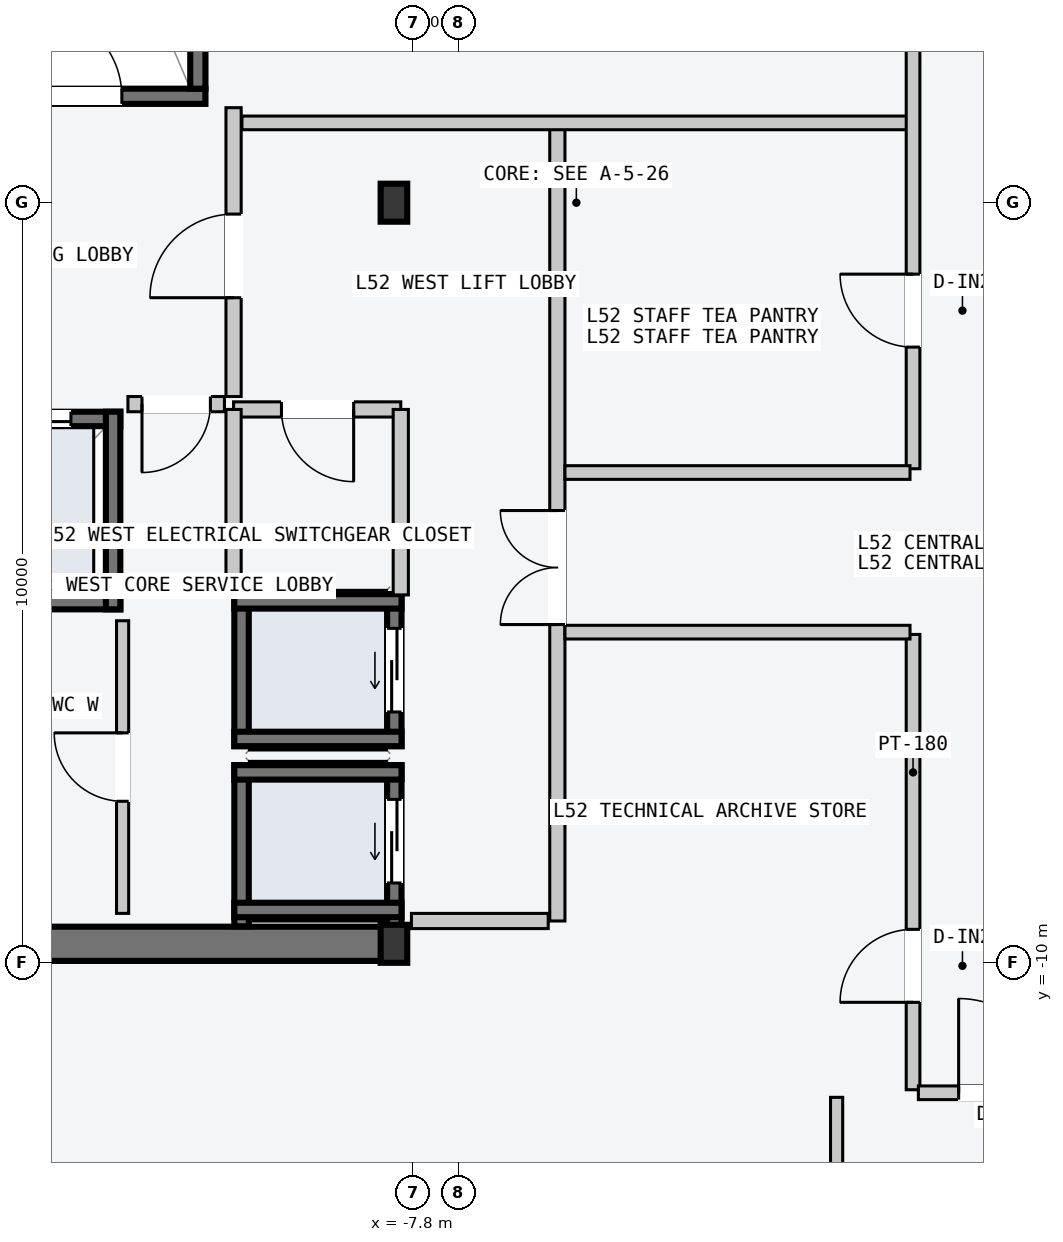
"""IFC4 building model, lengths in metres.
Left out: names, types, materials, properties, quantities, classifications, styles, units other than length and angle.
Written with IfcOpenShell. Run it as: python <this file> out.ifc"""

import sys

from ifc_helpers import new_model, si_unit, direction, frame, frame_2d, origin, origin_2d, place, context, subcontext, project, spatial, rectangle, i_section, extrude, element, fill, save


model = new_model("IFC4")
c1 = context("Model", 3, precision=1e-05, world=origin(), true_north=direction((0.0, 1.0)))
c2 = subcontext(c1, "Body", "Model", "MODEL_VIEW")
j1 = project(units=[si_unit("LENGTHUNIT", "METRE"), si_unit("PLANEANGLEUNIT", "RADIAN")], contexts=[c1])
p1 = place(None, origin())
s1 = spatial("IfcSite", under=j1, at=p1, CompositionType="ELEMENT")
p2 = place(p1, origin())
s2 = spatial("IfcBuilding", under=s1, at=p2, CompositionType="ELEMENT")
p3 = place(p2, frame((0.0, 0.0, 198.3)))
s3 = spatial("IfcBuildingStorey", under=s2, at=p3, CompositionType="ELEMENT", Elevation=198.3)
p4 = place(p3, frame((-14.53, -9.75, -0.2), z_axis=(0.0, 0.0, 1.0), x_axis=(1.0, 0.0, 0.0)))
e1 = element("IfcWall", 1, at=p4, inside=s3, PredefinedType="SHEAR", context=c2, shape_type="SweptSolid", body=[
    extrude(rectangle(XDim=6.46, YDim=0.45, at=frame_2d((3.23, 0.0))), origin(), (0.0, 0.0, 1.0), 3.6),
])
p5 = place(p3, frame((-14.25, 1.4, -0.2), z_axis=(0.0, 0.0, 1.0), x_axis=(1.0, 0.0, 0.0)))
e2 = element("IfcWall", 2, at=p5, inside=s3, PredefinedType="SOLIDWALL", context=c2, shape_type="SweptSolid", body=[
    extrude(rectangle(XDim=3.72, YDim=0.2, at=frame_2d((1.86, 0.0))), origin(), (0.0, 0.0, 1.0), 3.6),
])
p6 = place(p5, frame((1.5, 0.0, 0.2)))
e3 = element("IfcOpeningElement", 3, at=p6, cuts=e2, PredefinedType="OPENING", context=c2, shape_type="SweptSolid", body=[
    extrude(rectangle(XDim=1.12, YDim=2.18, at=frame_2d((0.56, 1.09))), frame((0.0, 0.11, 0.0), z_axis=(0.0, -1.0, 0.0), x_axis=(1.0, 0.0, 0.0)), (0.0, 0.0, 1.0), 0.22),
])
p7 = place(p3, frame((-10.63, 1.5, -0.2), z_axis=(0.0, 0.0, 1.0), x_axis=(0.0, 1.0, 0.0)))
e4 = element("IfcWall", 4, at=p7, inside=s3, PredefinedType="SOLIDWALL", context=c2, shape_type="SweptSolid", body=[
    extrude(rectangle(XDim=7.8, YDim=0.2, at=frame_2d((3.9, 0.0))), origin(), (0.0, 0.0, 1.0), 3.6),
])
for number, where, z_axis, x_axis in (
    (5, (-8.05, -9.75, 0.0), (0.0, 0.0, 1.0), (1.0, 0.0, 0.0)),
    (6, (-8.05, 0.0, 0.0), (0.0, 0.0, 1.0), (1.0, 0.0, 0.0)),
):
    element("IfcColumn", number, at=place(p3, frame(where, z_axis=z_axis, x_axis=x_axis)), inside=s3, PredefinedType="COLUMN", context=c2, shape_type="SweptSolid", body=[
        extrude(i_section(OverallWidth=0.35, OverallDepth=0.5, WebThickness=0.02, FlangeThickness=0.032, at=origin_2d()), origin(), (0.0, 0.0, 1.0), 3.6),
    ])
p8 = place(p3, frame((-8.045, -9.52, -0.2), z_axis=(0.0, 0.0, 1.0), x_axis=(0.0, 1.0, 0.0)))
e7 = element("IfcWall", 7, at=p8, inside=s3, PredefinedType="SOLIDWALL", context=c2, shape_type="SweptSolid", body=[
    extrude(rectangle(XDim=2.12, YDim=0.19, at=frame_2d((1.06, 0.0))), origin(), (0.0, 0.0, 1.0), 3.6),
])
p9 = place(p8, frame((0.57, 0.0, 0.2)))
e8 = element("IfcOpeningElement", 8, at=p9, cuts=e7, PredefinedType="OPENING", context=c2, shape_type="SweptSolid", body=[
    extrude(rectangle(XDim=1.1, YDim=2.2, at=frame_2d((0.55, 1.1))), frame((0.0, 0.105, 0.0), z_axis=(0.0, -1.0, 0.0), x_axis=(1.0, 0.0, 0.0)), (0.0, 0.0, 1.0), 0.21),
])
p10 = place(p3, frame((-10.055, -9.52, -0.2), z_axis=(0.0, 0.0, 1.0), x_axis=(0.0, 1.0, 0.0)))
e9 = element("IfcWall", 9, at=p10, inside=s3, PredefinedType="SOLIDWALL", context=c2, shape_type="SweptSolid", body=[
    extrude(rectangle(XDim=2.12, YDim=0.19, at=frame_2d((1.06, 0.0))), origin(), (0.0, 0.0, 1.0), 3.6),
])
for number, where, z_axis, x_axis in (
    (10, (-10.15, -7.495, -0.2), (0.0, 0.0, 1.0), (1.0, 0.0, 0.0)),
    (11, (-10.15, -9.305, -0.2), (0.0, 0.0, 1.0), (1.0, 0.0, 0.0)),
):
    element("IfcWall", number, at=place(p3, frame(where, z_axis=z_axis, x_axis=x_axis)), inside=s3, PredefinedType="SOLIDWALL", context=c2, shape_type="SweptSolid", body=[
        extrude(rectangle(XDim=2.2, YDim=0.19, at=frame_2d((1.1, 0.0))), origin(), (0.0, 0.0, 1.0), 3.6),
    ])
p11 = place(p3, frame((-8.045, -7.15, -0.2), z_axis=(0.0, 0.0, 1.0), x_axis=(0.0, 1.0, 0.0)))
e12 = element("IfcWall", 12, at=p11, inside=s3, PredefinedType="SOLIDWALL", context=c2, shape_type="SweptSolid", body=[
    extrude(rectangle(XDim=2.0, YDim=0.19, at=frame_2d((1.0, 0.0))), origin(), (0.0, 0.0, 1.0), 3.6),
])
p12 = place(p11, frame((0.45, 0.0, 0.2)))
e13 = element("IfcOpeningElement", 13, at=p12, cuts=e12, PredefinedType="OPENING", context=c2, shape_type="SweptSolid", body=[
    extrude(rectangle(XDim=1.1, YDim=2.2, at=frame_2d((0.55, 1.1))), frame((0.0, 0.105, 0.0), z_axis=(0.0, -1.0, 0.0), x_axis=(1.0, 0.0, 0.0)), (0.0, 0.0, 1.0), 0.21),
])
p13 = place(p3, frame((-10.055, -7.15, -0.2), z_axis=(0.0, 0.0, 1.0), x_axis=(0.0, 1.0, 0.0)))
e14 = element("IfcWall", 14, at=p13, inside=s3, PredefinedType="SOLIDWALL", context=c2, shape_type="SweptSolid", body=[
    extrude(rectangle(XDim=2.0, YDim=0.19, at=frame_2d((1.0, 0.0))), origin(), (0.0, 0.0, 1.0), 3.6),
])
for number, where, z_axis, x_axis in (
    (15, (-10.15, -5.245, -0.2), (0.0, 0.0, 1.0), (1.0, 0.0, 0.0)),
    (16, (-10.15, -7.055, -0.2), (0.0, 0.0, 1.0), (1.0, 0.0, 0.0)),
):
    element("IfcWall", number, at=place(p3, frame(where, z_axis=z_axis, x_axis=x_axis)), inside=s3, PredefinedType="SOLIDWALL", context=c2, shape_type="SweptSolid", body=[
        extrude(rectangle(XDim=2.2, YDim=0.19, at=frame_2d((1.1, 0.0))), origin(), (0.0, 0.0, 1.0), 3.6),
    ])
p14 = place(p3, frame((-14.33, -2.845, -0.2), z_axis=(0.0, 0.0, 1.0), x_axis=(1.0, 0.0, 0.0)))
e17 = element("IfcWall", 17, at=p14, inside=s3, PredefinedType="SOLIDWALL", context=c2, shape_type="SweptSolid", body=[
    extrude(rectangle(XDim=2.68, YDim=0.19, at=frame_2d((1.34, 0.0))), origin(), (0.0, 0.0, 1.0), 3.6),
])
p15 = place(p14, frame((0.83, 0.0, 0.2)))
e18 = element("IfcOpeningElement", 18, at=p15, cuts=e17, PredefinedType="OPENING", context=c2, shape_type="SweptSolid", body=[
    extrude(rectangle(XDim=1.2, YDim=2.2, at=frame_2d((0.6, 1.1))), frame((0.0, 0.105, 0.0), z_axis=(0.0, -1.0, 0.0), x_axis=(1.0, 0.0, 0.0)), (0.0, 0.0, 1.0), 0.21),
])
p16 = place(p3, frame((-14.33, -5.255, -0.2), z_axis=(0.0, 0.0, 1.0), x_axis=(1.0, 0.0, 0.0)))
e19 = element("IfcWall", 19, at=p16, inside=s3, PredefinedType="SOLIDWALL", context=c2, shape_type="SweptSolid", body=[
    extrude(rectangle(XDim=2.68, YDim=0.19, at=frame_2d((1.34, 0.0))), origin(), (0.0, 0.0, 1.0), 3.6),
])
p17 = place(p3, frame((-11.745, -5.35, -0.2), z_axis=(0.0, 0.0, 1.0), x_axis=(0.0, 1.0, 0.0)))
e20 = element("IfcWall", 20, at=p17, inside=s3, PredefinedType="SOLIDWALL", context=c2, shape_type="SweptSolid", body=[
    extrude(rectangle(XDim=2.6, YDim=0.19, at=frame_2d((1.3, 0.0))), origin(), (0.0, 0.0, 1.0), 3.6),
])
p18 = place(p3, frame((-5.9, -9.45, 0.0), z_axis=(0.0, 0.0, 1.0), x_axis=(0.0, 1.0, 0.0)))
e21 = element("IfcWall", 21, at=p18, inside=s3, PredefinedType="PARTITIONING", context=c2, shape_type="SweptSolid", body=[
    extrude(rectangle(XDim=10.5, YDim=0.2, at=frame_2d((5.25, 0.0))), origin(), (0.0, 0.0, 1.0), 3.4),
])
p19 = place(p18, frame((3.9, 0.0, 0.0)))
e22 = element("IfcOpeningElement", 22, at=p19, cuts=e21, PredefinedType="OPENING", context=c2, shape_type="SweptSolid", body=[
    extrude(rectangle(XDim=1.5, YDim=2.2, at=frame_2d((0.75, 1.1))), frame((0.0, 0.11, 0.0), z_axis=(0.0, -1.0, 0.0), x_axis=(1.0, 0.0, 0.0)), (0.0, 0.0, 1.0), 0.22),
])
p20 = place(p3, frame((-6.02, -9.45, 0.0), z_axis=(0.0, 0.0, 1.0), x_axis=(-1.0, 0.0, 0.0)))
e23 = element("IfcWall", 23, at=p20, inside=s3, PredefinedType="PARTITIONING", context=c2, shape_type="SweptSolid", body=[
    extrude(rectangle(XDim=1.8, YDim=0.2, at=frame_2d((0.9, 0.0))), origin(), (0.0, 0.0, 1.0), 3.4),
])
p21 = place(p3, frame((-10.16, -2.55, 0.0), z_axis=(0.0, 0.0, 1.0), x_axis=(0.0, 1.0, 0.0)))
e24 = element("IfcWall", 24, at=p21, inside=s3, PredefinedType="PARTITIONING", context=c2, shape_type="SweptSolid", body=[
    extrude(rectangle(XDim=3.8, YDim=0.2, at=frame_2d((1.9, 0.0))), origin(), (0.0, 0.0, 1.0), 3.4),
])
p22 = place(p21, frame((1.3, 0.0, 0.0)))
e25 = element("IfcOpeningElement", 25, at=p22, cuts=e24, PredefinedType="OPENING", context=c2, shape_type="SweptSolid", body=[
    extrude(rectangle(XDim=1.1, YDim=2.15, at=frame_2d((0.55, 1.075))), frame((0.0, 0.11, 0.0), z_axis=(0.0, -1.0, 0.0), x_axis=(1.0, 0.0, 0.0)), (0.0, 0.0, 1.0), 0.22),
])
p23 = place(p3, frame((-10.28, -2.65, 0.0), z_axis=(0.0, 0.0, 1.0), x_axis=(-1.0, 0.0, 0.0)))
e26 = element("IfcWall", 26, at=p23, inside=s3, PredefinedType="PARTITIONING", context=c2, shape_type="SweptSolid", body=[
    extrude(rectangle(XDim=1.27, YDim=0.2, at=frame_2d((0.635, 0.0))), origin(), (0.0, 0.0, 1.0), 3.4),
])
p24 = place(p23, frame((0.185, 0.0, 0.0)))
e27 = element("IfcOpeningElement", 27, at=p24, cuts=e26, PredefinedType="OPENING", context=c2, shape_type="SweptSolid", body=[
    extrude(rectangle(XDim=0.9, YDim=2.15, at=frame_2d((0.45, 1.075))), frame((0.0, 0.11, 0.0), z_axis=(0.0, -1.0, 0.0), x_axis=(1.0, 0.0, 0.0)), (0.0, 0.0, 1.0), 0.22),
])
p25 = place(p3, frame((-7.96, -2.72, 0.0), z_axis=(0.0, 0.0, 1.0), x_axis=(-1.0, 0.0, 0.0)))
e28 = element("IfcWall", 28, at=p25, inside=s3, PredefinedType="PARTITIONING", context=c2, shape_type="SweptSolid", body=[
    extrude(rectangle(XDim=2.2, YDim=0.2, at=frame_2d((1.1, 0.0))), origin(), (0.0, 0.0, 1.0), 3.4),
])
p26 = place(p25, frame((0.62, 0.0, 0.0)))
e29 = element("IfcOpeningElement", 29, at=p26, cuts=e28, PredefinedType="OPENING", context=c2, shape_type="SweptSolid", body=[
    extrude(rectangle(XDim=0.95, YDim=2.1, at=frame_2d((0.475, 1.05))), frame((0.0, 0.11, 0.0), z_axis=(0.0, -1.0, 0.0), x_axis=(1.0, 0.0, 0.0)), (0.0, 0.0, 1.0), 0.22),
])
for number, where, z_axis, x_axis in (
    (30, (-7.96, -5.16, 0.0), (0.0, 0.0, 1.0), (0.0, 1.0, 0.0)),
    (31, (-10.16, -5.16, 0.0), (0.0, 0.0, 1.0), (0.0, 1.0, 0.0)),
):
    element("IfcWall", number, at=place(p3, frame(where, z_axis=z_axis, x_axis=x_axis)), inside=s3, PredefinedType="PARTITIONING", context=c2, shape_type="SweptSolid", body=[
        extrude(rectangle(XDim=2.44, YDim=0.2, at=frame_2d((1.22, 0.0))), origin(), (0.0, 0.0, 1.0), 3.4),
    ])
p27 = place(p3, frame((-11.62, -9.35, 0.0), z_axis=(0.0, 0.0, 1.0), x_axis=(0.0, 1.0, 0.0)))
e32 = element("IfcWall", 32, at=p27, inside=s3, PredefinedType="PARTITIONING", context=c2, shape_type="SweptSolid", body=[
    extrude(rectangle(XDim=3.85, YDim=0.16, at=frame_2d((1.925, 0.0))), origin(), (0.0, 0.0, 1.0), 3.4),
])
p28 = place(p27, frame((1.475, 0.0, 0.0)))
e33 = element("IfcOpeningElement", 33, at=p28, cuts=e32, PredefinedType="OPENING", context=c2, shape_type="SweptSolid", body=[
    extrude(rectangle(XDim=0.9, YDim=2.15, at=frame_2d((0.45, 1.075))), frame((0.0, 0.09, 0.0), z_axis=(0.0, -1.0, 0.0), x_axis=(1.0, 0.0, 0.0)), (0.0, 0.0, 1.0), 0.18),
])
p29 = place(p3, frame((-10.05, 1.05, 0.0), z_axis=(0.0, 0.0, 1.0), x_axis=(1.0, 0.0, 0.0)))
e34 = element("IfcWall", 34, at=p29, inside=s3, PredefinedType="PARTITIONING", context=c2, shape_type="SweptSolid", body=[
    extrude(rectangle(XDim=8.79, YDim=0.18, at=frame_2d((4.395, 0.0))), origin(), (0.0, 0.0, 1.0), 3.4),
])
p30 = place(p3, frame((-1.22, -3.5, 0.0), z_axis=(0.0, 0.0, 1.0), x_axis=(0.0, 1.0, 0.0)))
e35 = element("IfcWall", 35, at=p30, inside=s3, PredefinedType="PARTITIONING", context=c2, shape_type="SweptSolid", body=[
    extrude(rectangle(XDim=15.17, YDim=0.18, at=frame_2d((7.585, 0.0))), origin(), (0.0, 0.0, 1.0), 3.4),
])
p31 = place(p30, frame((6.1, 0.0, 0.0)))
e36 = element("IfcOpeningElement", 36, at=p31, cuts=e35, PredefinedType="OPENING", context=c2, shape_type="SweptSolid", body=[
    extrude(rectangle(XDim=1.24, YDim=2.24, at=frame_2d((0.62, 1.12))), frame((0.0, 0.1, 0.0), z_axis=(0.0, -1.0, 0.0), x_axis=(1.0, 0.0, 0.0)), (0.0, 0.0, 1.0), 0.2),
])
p32 = place(p30, frame((1.6, 0.0, 0.0)))
e37 = element("IfcOpeningElement", 37, at=p32, cuts=e35, PredefinedType="OPENING", context=c2, shape_type="SweptSolid", body=[
    extrude(rectangle(XDim=0.96, YDim=2.18, at=frame_2d((0.48, 1.09))), frame((0.0, 0.1, 0.0), z_axis=(0.0, -1.0, 0.0), x_axis=(1.0, 0.0, 0.0)), (0.0, 0.0, 1.0), 0.2),
])
p33 = place(p3, frame((-5.8, -3.55, 0.0), z_axis=(0.0, 0.0, 1.0), x_axis=(1.0, 0.0, 0.0)))
e38 = element("IfcWall", 38, at=p33, inside=s3, PredefinedType="PARTITIONING", context=c2, shape_type="SweptSolid", body=[
    extrude(rectangle(XDim=4.54, YDim=0.18, at=frame_2d((2.27, 0.0))), origin(), (0.0, 0.0, 1.0), 3.4),
])
p34 = place(p3, frame((-1.22, -11.67, 0.0), z_axis=(0.0, 0.0, 1.0), x_axis=(0.0, 1.0, 0.0)))
e39 = element("IfcWall", 39, at=p34, inside=s3, PredefinedType="PARTITIONING", context=c2, shape_type="SweptSolid", body=[
    extrude(rectangle(XDim=5.99, YDim=0.18, at=frame_2d((2.995, 0.0))), origin(), (0.0, 0.0, 1.0), 3.4),
])
p35 = place(p34, frame((1.15, 0.0, 0.0)))
e40 = element("IfcOpeningElement", 40, at=p35, cuts=e39, PredefinedType="OPENING", context=c2, shape_type="SweptSolid", body=[
    extrude(rectangle(XDim=0.96, YDim=2.18, at=frame_2d((0.48, 1.09))), frame((0.0, 0.1, 0.0), z_axis=(0.0, -1.0, 0.0), x_axis=(1.0, 0.0, 0.0)), (0.0, 0.0, 1.0), 0.2),
])
p36 = place(p3, frame((-5.8, -5.65, 0.0), z_axis=(0.0, 0.0, 1.0), x_axis=(1.0, 0.0, 0.0)))
e41 = element("IfcWall", 41, at=p36, inside=s3, PredefinedType="PARTITIONING", context=c2, shape_type="SweptSolid", body=[
    extrude(rectangle(XDim=4.54, YDim=0.18, at=frame_2d((2.27, 0.0))), origin(), (0.0, 0.0, 1.0), 3.4),
])
p37 = place(p3, frame((-2.226, -18.56, 0.0), z_axis=(0.0, 0.0, 1.0), x_axis=(0.0, 1.0, 0.0)))
e42 = element("IfcWall", 42, at=p37, inside=s3, PredefinedType="PARTITIONING", context=c2, shape_type="SweptSolid", body=[
    extrude(rectangle(XDim=6.79, YDim=0.16, at=frame_2d((3.395, 0.0))), origin(), (0.0, 0.0, 1.0), 3.4),
])
p38 = place(p37, frame((1.05, 0.0, 0.0)))
e43 = element("IfcOpeningElement", 43, at=p38, cuts=e42, PredefinedType="OPENING", context=c2, shape_type="SweptSolid", body=[
    extrude(rectangle(XDim=0.96, YDim=2.18, at=frame_2d((0.48, 1.09))), frame((0.0, 0.09, 0.0), z_axis=(0.0, -1.0, 0.0), x_axis=(1.0, 0.0, 0.0)), (0.0, 0.0, 1.0), 0.18),
])
p39 = place(p3, frame((-1.15, -11.71, 0.0), z_axis=(0.0, 0.0, 1.0), x_axis=(1.0, 0.0, 0.0)))
e44 = element("IfcWall", 44, at=p39, inside=s3, PredefinedType="PARTITIONING", context=c2, shape_type="SweptSolid", body=[
    extrude(rectangle(XDim=2.3, YDim=0.18, at=frame_2d((1.15, 0.0))), origin(), (0.0, 0.0, 1.0), 3.4),
])
p40 = place(p39, frame((0.53, 0.0, 0.0)))
e45 = element("IfcOpeningElement", 45, at=p40, cuts=e44, PredefinedType="OPENING", context=c2, shape_type="SweptSolid", body=[
    extrude(rectangle(XDim=1.24, YDim=2.24, at=frame_2d((0.62, 1.12))), frame((0.0, 0.1, 0.0), z_axis=(0.0, -1.0, 0.0), x_axis=(1.0, 0.0, 0.0)), (0.0, 0.0, 1.0), 0.2),
])
p41 = place(p6, origin())
e46 = element("IfcDoor", 46, at=p41, inside=s3, OperationType="SINGLE_SWING_LEFT", PredefinedType="DOOR", context=c2, shape_type="SweptSolid", body=[
    extrude(rectangle(XDim=1.12, YDim=2.18, at=frame_2d((0.56, 1.09))), frame((0.0, 0.025, 0.0), z_axis=(0.0, -1.0, 0.0), x_axis=(1.0, 0.0, 0.0)), (0.0, 0.0, 1.0), 0.05),
])
fill(e3, e46)
p42 = place(p9, origin())
e47 = element("IfcDoor", 47, at=p42, inside=s3, OperationType="SLIDING_TO_LEFT", PredefinedType="DOOR", context=c2, shape_type="SweptSolid", body=[
    extrude(rectangle(XDim=1.1, YDim=2.2, at=frame_2d((0.55, 1.1))), frame((0.0, 0.025, 0.0), z_axis=(0.0, -1.0, 0.0), x_axis=(1.0, 0.0, 0.0)), (0.0, 0.0, 1.0), 0.05),
])
fill(e8, e47)
p43 = place(p12, origin())
e48 = element("IfcDoor", 48, at=p43, inside=s3, OperationType="SLIDING_TO_LEFT", PredefinedType="DOOR", context=c2, shape_type="SweptSolid", body=[
    extrude(rectangle(XDim=1.1, YDim=2.2, at=frame_2d((0.55, 1.1))), frame((0.0, 0.025, 0.0), z_axis=(0.0, -1.0, 0.0), x_axis=(1.0, 0.0, 0.0)), (0.0, 0.0, 1.0), 0.05),
])
fill(e13, e48)
p44 = place(p15, origin())
e49 = element("IfcDoor", 49, at=p44, inside=s3, OperationType="SLIDING_TO_LEFT", PredefinedType="DOOR", context=c2, shape_type="SweptSolid", body=[
    extrude(rectangle(XDim=1.2, YDim=2.2, at=frame_2d((0.6, 1.1))), frame((0.0, 0.025, 0.0), z_axis=(0.0, -1.0, 0.0), x_axis=(1.0, 0.0, 0.0)), (0.0, 0.0, 1.0), 0.05),
])
fill(e18, e49)
p45 = place(p19, origin())
e50 = element("IfcDoor", 50, at=p45, inside=s3, OperationType="DOUBLE_DOOR_SINGLE_SWING", PredefinedType="DOOR", context=c2, shape_type="SweptSolid", body=[
    extrude(rectangle(XDim=1.5, YDim=2.2, at=frame_2d((0.75, 1.1))), frame((0.0, 0.025, 0.0), z_axis=(0.0, -1.0, 0.0), x_axis=(1.0, 0.0, 0.0)), (0.0, 0.0, 1.0), 0.05),
])
fill(e22, e50)
p46 = place(p22, origin())
e51 = element("IfcDoor", 51, at=p46, inside=s3, OperationType="SINGLE_SWING_LEFT", PredefinedType="DOOR", context=c2, shape_type="SweptSolid", body=[
    extrude(rectangle(XDim=1.1, YDim=2.15, at=frame_2d((0.55, 1.075))), frame((0.0, 0.025, 0.0), z_axis=(0.0, -1.0, 0.0), x_axis=(1.0, 0.0, 0.0)), (0.0, 0.0, 1.0), 0.05),
])
fill(e25, e51)
p47 = place(p24, origin())
e52 = element("IfcDoor", 52, at=p47, inside=s3, OperationType="SINGLE_SWING_RIGHT", PredefinedType="DOOR", context=c2, shape_type="SweptSolid", body=[
    extrude(rectangle(XDim=0.9, YDim=2.15, at=frame_2d((0.45, 1.075))), frame((0.0, 0.025, 0.0), z_axis=(0.0, -1.0, 0.0), x_axis=(1.0, 0.0, 0.0)), (0.0, 0.0, 1.0), 0.05),
])
fill(e27, e52)
p48 = place(p26, origin())
e53 = element("IfcDoor", 53, at=p48, inside=s3, OperationType="SINGLE_SWING_LEFT", PredefinedType="DOOR", context=c2, shape_type="SweptSolid", body=[
    extrude(rectangle(XDim=0.95, YDim=2.1, at=frame_2d((0.475, 1.05))), frame((0.0, 0.025, 0.0), z_axis=(0.0, -1.0, 0.0), x_axis=(1.0, 0.0, 0.0)), (0.0, 0.0, 1.0), 0.05),
])
fill(e29, e53)
p49 = place(p28, origin())
e54 = element("IfcDoor", 54, at=p49, inside=s3, OperationType="SINGLE_SWING_RIGHT", PredefinedType="DOOR", context=c2, shape_type="SweptSolid", body=[
    extrude(rectangle(XDim=0.9, YDim=2.15, at=frame_2d((0.45, 1.075))), frame((0.0, 0.025, 0.0), z_axis=(0.0, -1.0, 0.0), x_axis=(1.0, 0.0, 0.0)), (0.0, 0.0, 1.0), 0.05),
])
fill(e33, e54)
p50 = place(p32, origin())
e55 = element("IfcDoor", 55, at=p50, inside=s3, OperationType="SINGLE_SWING_RIGHT", PredefinedType="DOOR", context=c2, shape_type="SweptSolid", body=[
    extrude(rectangle(XDim=0.96, YDim=2.18, at=frame_2d((0.48, 1.09))), frame((0.0, 0.025, 0.0), z_axis=(0.0, -1.0, 0.0), x_axis=(1.0, 0.0, 0.0)), (0.0, 0.0, 1.0), 0.05),
])
fill(e37, e55)
p51 = place(p35, origin())
e56 = element("IfcDoor", 56, at=p51, inside=s3, OperationType="SINGLE_SWING_LEFT", PredefinedType="DOOR", context=c2, shape_type="SweptSolid", body=[
    extrude(rectangle(XDim=0.96, YDim=2.18, at=frame_2d((0.48, 1.09))), frame((0.0, 0.025, 0.0), z_axis=(0.0, -1.0, 0.0), x_axis=(1.0, 0.0, 0.0)), (0.0, 0.0, 1.0), 0.05),
])
fill(e40, e56)
p52 = place(p40, origin())
e57 = element("IfcDoor", 57, at=p52, inside=s3, OperationType="SINGLE_SWING_LEFT", PredefinedType="DOOR", context=c2, shape_type="SweptSolid", body=[
    extrude(rectangle(XDim=1.24, YDim=2.24, at=frame_2d((0.62, 1.12))), frame((0.0, 0.025, 0.0), z_axis=(0.0, -1.0, 0.0), x_axis=(1.0, 0.0, 0.0)), (0.0, 0.0, 1.0), 0.05),
])
fill(e45, e57)
save(model, sys.argv[1])
